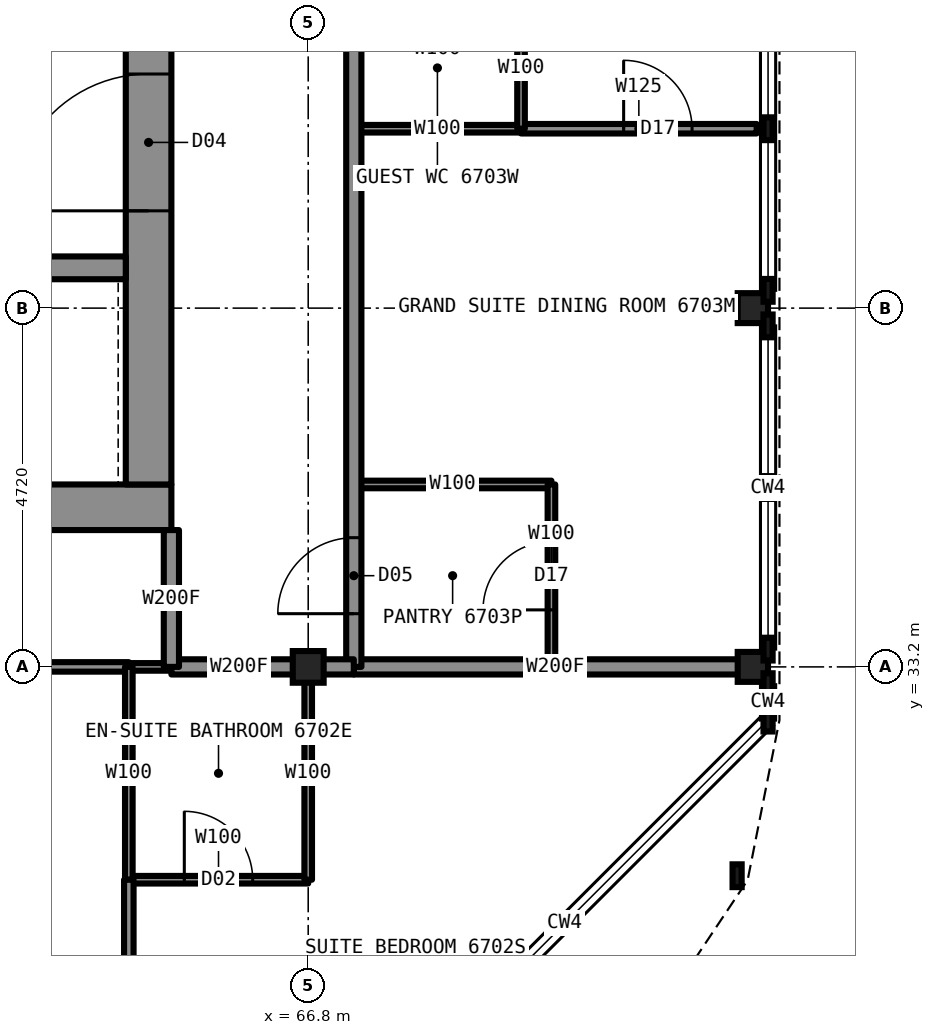
"""IFC4 building model, lengths in metres.
Left out: names, types, materials, properties, quantities, classifications, styles, units other than length and angle.
Written with IfcOpenShell. Run it as: python <this file> out.ifc"""

import sys

from ifc_helpers import new_model, si_unit, direction, frame, frame_2d, origin, origin_2d, place, context, subcontext, project, spatial, rectangle, i_section, extrude, element, fill, save


model = new_model("IFC4")
c1 = context("Model", 3, precision=1e-05, world=origin(), true_north=direction((0.0, 1.0)))
c2 = subcontext(c1, "Body", "Model", "MODEL_VIEW")
j1 = project(units=[si_unit("LENGTHUNIT", "METRE"), si_unit("PLANEANGLEUNIT", "RADIAN")], contexts=[c1])
p1 = place(None, origin())
s1 = spatial("IfcSite", under=j1, at=p1, CompositionType="ELEMENT")
p2 = place(p1, origin())
s2 = spatial("IfcBuilding", under=s1, at=p2, CompositionType="ELEMENT")
p3 = place(p2, frame((0.0, 0.0, 247.7)))
s3 = spatial("IfcBuildingStorey", under=s2, at=p3, CompositionType="ELEMENT", Elevation=247.7)
for number, where, z_axis, x_axis in (
    (1, (72.65, 33.2, 0.0), (0.0, 0.0, 1.0), (1.0, 0.0, 0.0)),
    (2, (72.65, 37.92, 0.0), (0.0, 0.0, 1.0), (1.0, 0.0, 0.0)),
):
    element("IfcColumn", number, at=place(p3, frame(where, z_axis=z_axis, x_axis=x_axis)), inside=s3, PredefinedType="COLUMN", context=c2, shape_type="SweptSolid", body=[
        extrude(i_section(OverallWidth=0.399, OverallDepth=0.394, WebThickness=0.023, FlangeThickness=0.037, at=origin_2d()), origin(), (0.0, 0.0, 1.0), 3.5),
    ])
p4 = place(p3, frame((66.8, 33.2, 0.0), z_axis=(0.0, 0.0, 1.0), x_axis=(1.0, 0.0, 0.0)))
e3 = element("IfcColumn", 3, at=p4, inside=s3, PredefinedType="COLUMN", context=c2, shape_type="SweptSolid", body=[
    extrude(i_section(OverallWidth=0.406, OverallDepth=0.417, WebThickness=0.03, FlangeThickness=0.048, at=origin_2d()), origin(), (0.0, 0.0, 1.0), 3.5),
])
p5 = place(p3, frame((45.0, 35.3, 0.0), z_axis=(0.0, 0.0, 1.0), x_axis=(1.0, 0.0, 0.0)))
e4 = element("IfcWall", 4, at=p5, inside=s3, PredefinedType="SHEAR", context=c2, shape_type="SweptSolid", body=[
    extrude(rectangle(XDim=20.0, YDim=0.6, at=frame_2d((10.0, 0.0))), origin(), (0.0, 0.0, 1.0), 3.5),
])
p6 = place(p3, frame((64.7, 35.6, 0.0), z_axis=(0.0, 0.0, 1.0), x_axis=(0.0, 1.0, 0.0)))
e5 = element("IfcWall", 5, at=p6, inside=s3, PredefinedType="SHEAR", context=c2, shape_type="SweptSolid", body=[
    extrude(rectangle(XDim=18.8, YDim=0.6, at=frame_2d((9.4, 0.0))), origin(), (0.0, 0.0, 1.0), 3.5),
])
p7 = place(p6, frame((13.4, 0.0, 0.0)))
e6 = element("IfcOpeningElement", 6, at=p7, cuts=e5, PredefinedType="OPENING", context=c2, shape_type="SweptSolid", body=[
    extrude(rectangle(XDim=1.8, YDim=2.2, at=frame_2d((0.9, 1.1))), frame((0.0, 0.31, 0.0), z_axis=(0.0, -1.0, 0.0), x_axis=(1.0, 0.0, 0.0)), (0.0, 0.0, 1.0), 0.62),
])
p8 = place(p6, frame((3.6, 0.0, 0.0)))
e7 = element("IfcOpeningElement", 7, at=p8, cuts=e5, PredefinedType="OPENING", context=c2, shape_type="SweptSolid", body=[
    extrude(rectangle(XDim=1.8, YDim=2.2, at=frame_2d((0.9, 1.1))), frame((0.0, 0.31, 0.0), z_axis=(0.0, -1.0, 0.0), x_axis=(1.0, 0.0, 0.0)), (0.0, 0.0, 1.0), 0.62),
])
p9 = place(p3, frame((45.6, 38.45, 0.0), z_axis=(0.0, 0.0, 1.0), x_axis=(1.0, 0.0, 0.0)))
e8 = element("IfcWall", 8, at=p9, inside=s3, PredefinedType="SHEAR", context=c2, shape_type="SweptSolid", body=[
    extrude(rectangle(XDim=18.8, YDim=0.3, at=frame_2d((9.4, 0.0))), origin(), (0.0, 0.0, 1.0), 3.5),
])
p10 = place(p9, frame((0.7, 0.0, 0.0)))
e9 = element("IfcOpeningElement", 9, at=p10, cuts=e8, PredefinedType="OPENING", context=c2, shape_type="SweptSolid", body=[
    extrude(rectangle(XDim=1.1, YDim=2.2, at=frame_2d((0.55, 1.1))), frame((0.0, 0.16, 0.0), z_axis=(0.0, -1.0, 0.0), x_axis=(1.0, 0.0, 0.0)), (0.0, 0.0, 1.0), 0.32),
])
p11 = place(p9, frame((3.4, 0.0, 0.0)))
e10 = element("IfcOpeningElement", 10, at=p11, cuts=e8, PredefinedType="OPENING", context=c2, shape_type="SweptSolid", body=[
    extrude(rectangle(XDim=1.1, YDim=2.2, at=frame_2d((0.55, 1.1))), frame((0.0, 0.16, 0.0), z_axis=(0.0, -1.0, 0.0), x_axis=(1.0, 0.0, 0.0)), (0.0, 0.0, 1.0), 0.32),
])
p12 = place(p9, frame((6.1, 0.0, 0.0)))
e11 = element("IfcOpeningElement", 11, at=p12, cuts=e8, PredefinedType="OPENING", context=c2, shape_type="SweptSolid", body=[
    extrude(rectangle(XDim=1.1, YDim=2.2, at=frame_2d((0.55, 1.1))), frame((0.0, 0.16, 0.0), z_axis=(0.0, -1.0, 0.0), x_axis=(1.0, 0.0, 0.0)), (0.0, 0.0, 1.0), 0.32),
])
p13 = place(p9, frame((8.8, 0.0, 0.0)))
e12 = element("IfcOpeningElement", 12, at=p13, cuts=e8, PredefinedType="OPENING", context=c2, shape_type="SweptSolid", body=[
    extrude(rectangle(XDim=1.1, YDim=2.2, at=frame_2d((0.55, 1.1))), frame((0.0, 0.16, 0.0), z_axis=(0.0, -1.0, 0.0), x_axis=(1.0, 0.0, 0.0)), (0.0, 0.0, 1.0), 0.32),
])
p14 = place(p3, frame((64.44, 33.2, 0.0), z_axis=(0.0, 0.0, 1.0), x_axis=(1.0, 0.0, 0.0)))
e13 = element("IfcWall", 13, at=p14, inside=s3, PredefinedType="PARTITIONING", context=c2, shape_type="SweptSolid", body=[
    extrude(rectangle(XDim=0.56, YDim=0.1, at=frame_2d((0.28, 0.0))), origin(), (0.0, 0.0, 1.0), 3.33),
])
p15 = place(p3, frame((65.0, 33.2, 0.0), z_axis=(0.0, 0.0, 1.0), x_axis=(1.0, 0.0, 0.0)))
e14 = element("IfcWall", 14, at=p15, inside=s3, PredefinedType="PARTITIONING", context=c2, shape_type="SweptSolid", body=[
    extrude(rectangle(XDim=1.78, YDim=0.2, at=frame_2d((0.89, 0.0))), origin(), (0.0, 0.0, 1.0), 3.33),
])
p16 = place(p3, frame((67.4, 33.2, 0.0), z_axis=(0.0, 0.0, 1.0), x_axis=(1.0, 0.0, 0.0)))
e15 = element("IfcWall", 15, at=p16, inside=s3, PredefinedType="PARTITIONING", context=c2, shape_type="SweptSolid", body=[
    extrude(rectangle(XDim=5.3, YDim=0.2, at=frame_2d((2.65, 0.0))), origin(), (0.0, 0.0, 1.0), 2.573),
])
p17 = place(p3, frame((57.36, 33.2, 0.0), z_axis=(0.0, 0.0, 1.0), x_axis=(1.0, 0.0, 0.0)))
e16 = element("IfcWall", 16, at=p17, inside=s3, PredefinedType="PARTITIONING", context=c2, shape_type="SweptSolid", body=[
    extrude(rectangle(XDim=7.08, YDim=0.125, at=frame_2d((3.54, 0.0))), origin(), (0.0, 0.0, 1.0), 3.33),
])
p18 = place(p3, frame((64.44, 30.4, 0.0), z_axis=(0.0, 0.0, 1.0), x_axis=(1.0, 0.0, 0.0)))
e17 = element("IfcWall", 17, at=p18, inside=s3, PredefinedType="PARTITIONING", context=c2, shape_type="SweptSolid", body=[
    extrude(rectangle(XDim=2.36, YDim=0.1, at=frame_2d((1.18, 0.0))), origin(), (0.0, 0.0, 1.0), 3.33),
])
p19 = place(p18, frame((0.73, 0.0, 0.0)))
e18 = element("IfcOpeningElement", 18, at=p19, cuts=e17, PredefinedType="OPENING", context=c2, shape_type="SweptSolid", body=[
    extrude(rectangle(XDim=0.9, YDim=2.1, at=frame_2d((0.45, 1.05))), frame((0.0, 0.06, 0.0), z_axis=(0.0, -1.0, 0.0), x_axis=(1.0, 0.0, 0.0)), (0.0, 0.0, 1.0), 0.12),
])
p20 = place(p3, frame((67.4, 40.28, 0.0), z_axis=(0.0, 0.0, 1.0), x_axis=(1.0, 0.0, 0.0)))
e19 = element("IfcWall", 19, at=p20, inside=s3, PredefinedType="PARTITIONING", context=c2, shape_type="SweptSolid", body=[
    extrude(rectangle(XDim=2.2, YDim=0.1, at=frame_2d((1.1, 0.0))), origin(), (0.0, 0.0, 1.0), 2.797),
])
p21 = place(p3, frame((69.6, 40.28, 0.0), z_axis=(0.0, 0.0, 1.0), x_axis=(1.0, 0.0, 0.0)))
e20 = element("IfcWall", 20, at=p21, inside=s3, PredefinedType="PARTITIONING", context=c2, shape_type="SweptSolid", body=[
    extrude(rectangle(XDim=3.1, YDim=0.125, at=frame_2d((1.55, 0.0))), origin(), (0.0, 0.0, 1.0), 2.797),
])
p22 = place(p21, frame((1.35, 0.0, 0.0)))
e21 = element("IfcOpeningElement", 21, at=p22, cuts=e20, PredefinedType="OPENING", context=c2, shape_type="SweptSolid", body=[
    extrude(rectangle(XDim=0.9, YDim=2.2, at=frame_2d((0.45, 1.1))), frame((0.0, 0.073, 0.0), z_axis=(0.0, -1.0, 0.0), x_axis=(1.0, 0.0, 0.0)), (0.0, 0.0, 1.0), 0.145),
])
p23 = place(p3, frame((67.4, 35.6, 0.0), z_axis=(0.0, 0.0, 1.0), x_axis=(1.0, 0.0, 0.0)))
e22 = element("IfcWall", 22, at=p23, inside=s3, PredefinedType="PARTITIONING", context=c2, shape_type="SweptSolid", body=[
    extrude(rectangle(XDim=2.6, YDim=0.1, at=frame_2d((1.3, 0.0))), origin(), (0.0, 0.0, 1.0), 2.797),
])
p24 = place(p3, frame((65.0, 33.2, 0.0), z_axis=(0.0, 0.0, 1.0), x_axis=(0.0, 1.0, 0.0)))
e23 = element("IfcWall", 23, at=p24, inside=s3, PredefinedType="PARTITIONING", context=c2, shape_type="SweptSolid", body=[
    extrude(rectangle(XDim=1.8, YDim=0.2, at=frame_2d((0.9, 0.0))), origin(), (0.0, 0.0, 1.0), 3.33),
])
p25 = place(p3, frame((66.8, 30.4, 0.0), z_axis=(0.0, 0.0, 1.0), x_axis=(0.0, 1.0, 0.0)))
e24 = element("IfcWall", 24, at=p25, inside=s3, PredefinedType="PARTITIONING", context=c2, shape_type="SweptSolid", body=[
    extrude(rectangle(XDim=2.8, YDim=0.1, at=frame_2d((1.4, 0.0))), origin(), (0.0, 0.0, 1.0), 2.573),
])
p26 = place(p3, frame((67.4, 33.2, 0.0), z_axis=(0.0, 0.0, 1.0), x_axis=(0.0, 1.0, 0.0)))
e25 = element("IfcWall", 25, at=p26, inside=s3, PredefinedType="PARTITIONING", context=c2, shape_type="SweptSolid", body=[
    extrude(rectangle(XDim=23.6, YDim=0.2, at=frame_2d((11.8, 0.0))), origin(), (0.0, 0.0, 1.0), 3.33),
])
p27 = place(p26, frame((8.95, 0.0, 0.0)))
e26 = element("IfcOpeningElement", 26, at=p27, cuts=e25, PredefinedType="OPENING", context=c2, shape_type="SweptSolid", body=[
    extrude(rectangle(XDim=1.1, YDim=2.2, at=frame_2d((0.55, 1.1))), frame((0.0, 0.11, 0.0), z_axis=(0.0, -1.0, 0.0), x_axis=(1.0, 0.0, 0.0)), (0.0, 0.0, 1.0), 0.22),
])
p28 = place(p26, frame((0.7, 0.0, 0.0)))
e27 = element("IfcOpeningElement", 27, at=p28, cuts=e25, PredefinedType="OPENING", context=c2, shape_type="SweptSolid", body=[
    extrude(rectangle(XDim=1.0, YDim=2.1, at=frame_2d((0.5, 1.05))), frame((0.0, 0.11, 0.0), z_axis=(0.0, -1.0, 0.0), x_axis=(1.0, 0.0, 0.0)), (0.0, 0.0, 1.0), 0.22),
])
p29 = place(p3, frame((69.6, 40.28, 0.0), z_axis=(0.0, 0.0, 1.0), x_axis=(0.0, 1.0, 0.0)))
e28 = element("IfcWall", 28, at=p29, inside=s3, PredefinedType="PARTITIONING", context=c2, shape_type="SweptSolid", body=[
    extrude(rectangle(XDim=1.6, YDim=0.1, at=frame_2d((0.8, 0.0))), origin(), (0.0, 0.0, 1.0), 3.33),
])
p30 = place(p3, frame((70.0, 33.2, 0.0), z_axis=(0.0, 0.0, 1.0), x_axis=(0.0, 1.0, 0.0)))
e29 = element("IfcWall", 29, at=p30, inside=s3, PredefinedType="PARTITIONING", context=c2, shape_type="SweptSolid", body=[
    extrude(rectangle(XDim=2.4, YDim=0.1, at=frame_2d((1.2, 0.0))), origin(), (0.0, 0.0, 1.0), 3.33),
])
p31 = place(p30, frame((0.75, 0.0, 0.0)))
e30 = element("IfcOpeningElement", 30, at=p31, cuts=e29, PredefinedType="OPENING", context=c2, shape_type="SweptSolid", body=[
    extrude(rectangle(XDim=0.9, YDim=2.2, at=frame_2d((0.45, 1.1))), frame((0.0, 0.06, 0.0), z_axis=(0.0, -1.0, 0.0), x_axis=(1.0, 0.0, 0.0)), (0.0, 0.0, 1.0), 0.12),
])
p32 = place(p3, frame((64.44, 30.4, 0.0), z_axis=(0.0, 0.0, 1.0), x_axis=(0.0, 1.0, 0.0)))
e31 = element("IfcWall", 31, at=p32, inside=s3, PredefinedType="PARTITIONING", context=c2, shape_type="SweptSolid", body=[
    extrude(rectangle(XDim=2.8, YDim=0.1, at=frame_2d((1.4, 0.0))), origin(), (0.0, 0.0, 1.0), 3.33),
])
p33 = place(p3, frame((64.44, 27.3, 0.0), z_axis=(0.0, 0.0, 1.0), x_axis=(0.0, 1.0, 0.0)))
e32 = element("IfcWall", 32, at=p33, inside=s3, PredefinedType="PARTITIONING", context=c2, shape_type="SweptSolid", body=[
    extrude(rectangle(XDim=3.1, YDim=0.125, at=frame_2d((1.55, 0.0))), origin(), (0.0, 0.0, 1.0), 3.33),
])
p34 = place(p33, frame((0.95, 0.0, 0.0)))
e33 = element("IfcOpeningElement", 33, at=p34, cuts=e32, PredefinedType="OPENING", context=c2, shape_type="SweptSolid", body=[
    extrude(rectangle(XDim=0.9, YDim=2.2, at=frame_2d((0.45, 1.1))), frame((0.0, 0.073, 0.0), z_axis=(0.0, -1.0, 0.0), x_axis=(1.0, 0.0, 0.0)), (0.0, 0.0, 1.0), 0.145),
])
p35 = place(p3, frame((66.78, 33.2, 0.0), z_axis=(0.0, 0.0, 1.0), x_axis=(1.0, 0.0, 0.0)))
e34 = element("IfcWall", 34, at=p35, inside=s3, PredefinedType="PARTITIONING", context=c2, shape_type="SweptSolid", body=[
    extrude(rectangle(XDim=0.62, YDim=0.2, at=frame_2d((0.31, 0.0))), origin(), (0.0, 0.0, 1.0), 2.573),
])
p36 = place(p19, origin())
e35 = element("IfcDoor", 35, at=p36, inside=s3, OperationType="SINGLE_SWING_RIGHT", PredefinedType="DOOR", context=c2, shape_type="SweptSolid", body=[
    extrude(rectangle(XDim=0.9, YDim=2.1, at=frame_2d((0.45, 1.05))), frame((0.0, 0.025, 0.0), z_axis=(0.0, -1.0, 0.0), x_axis=(1.0, 0.0, 0.0)), (0.0, 0.0, 1.0), 0.05),
])
fill(e18, e35)
p37 = place(p22, origin())
e36 = element("IfcDoor", 36, at=p37, inside=s3, OperationType="SINGLE_SWING_LEFT", PredefinedType="DOOR", context=c2, shape_type="SweptSolid", body=[
    extrude(rectangle(XDim=0.9, YDim=2.2, at=frame_2d((0.45, 1.1))), frame((0.0, 0.025, 0.0), z_axis=(0.0, -1.0, 0.0), x_axis=(1.0, 0.0, 0.0)), (0.0, 0.0, 1.0), 0.05),
])
fill(e21, e36)
p38 = place(p31, origin())
e37 = element("IfcDoor", 37, at=p38, inside=s3, OperationType="SINGLE_SWING_LEFT", PredefinedType="DOOR", context=c2, shape_type="SweptSolid", body=[
    extrude(rectangle(XDim=0.9, YDim=2.2, at=frame_2d((0.45, 1.1))), frame((0.0, 0.025, 0.0), z_axis=(0.0, -1.0, 0.0), x_axis=(1.0, 0.0, 0.0)), (0.0, 0.0, 1.0), 0.05),
])
fill(e30, e37)
p39 = place(p28, origin())
e38 = element("IfcDoor", 38, at=p39, inside=s3, OperationType="SINGLE_SWING_LEFT", PredefinedType="DOOR", context=c2, shape_type="SweptSolid", body=[
    extrude(rectangle(XDim=1.0, YDim=2.1, at=frame_2d((0.5, 1.05))), frame((0.0, 0.025, 0.0), z_axis=(0.0, -1.0, 0.0), x_axis=(1.0, 0.0, 0.0)), (0.0, 0.0, 1.0), 0.05),
])
fill(e27, e38)
p40 = place(p8, origin())
e39 = element("IfcDoor", 39, at=p40, inside=s3, OperationType="DOUBLE_DOOR_SINGLE_SWING", PredefinedType="DOOR", context=c2, shape_type="SweptSolid", body=[
    extrude(rectangle(XDim=1.8, YDim=2.2, at=frame_2d((0.9, 1.1))), frame((0.0, 0.025, 0.0), z_axis=(0.0, -1.0, 0.0), x_axis=(1.0, 0.0, 0.0)), (0.0, 0.0, 1.0), 0.05),
])
fill(e7, e39)
save(model, sys.argv[1])
